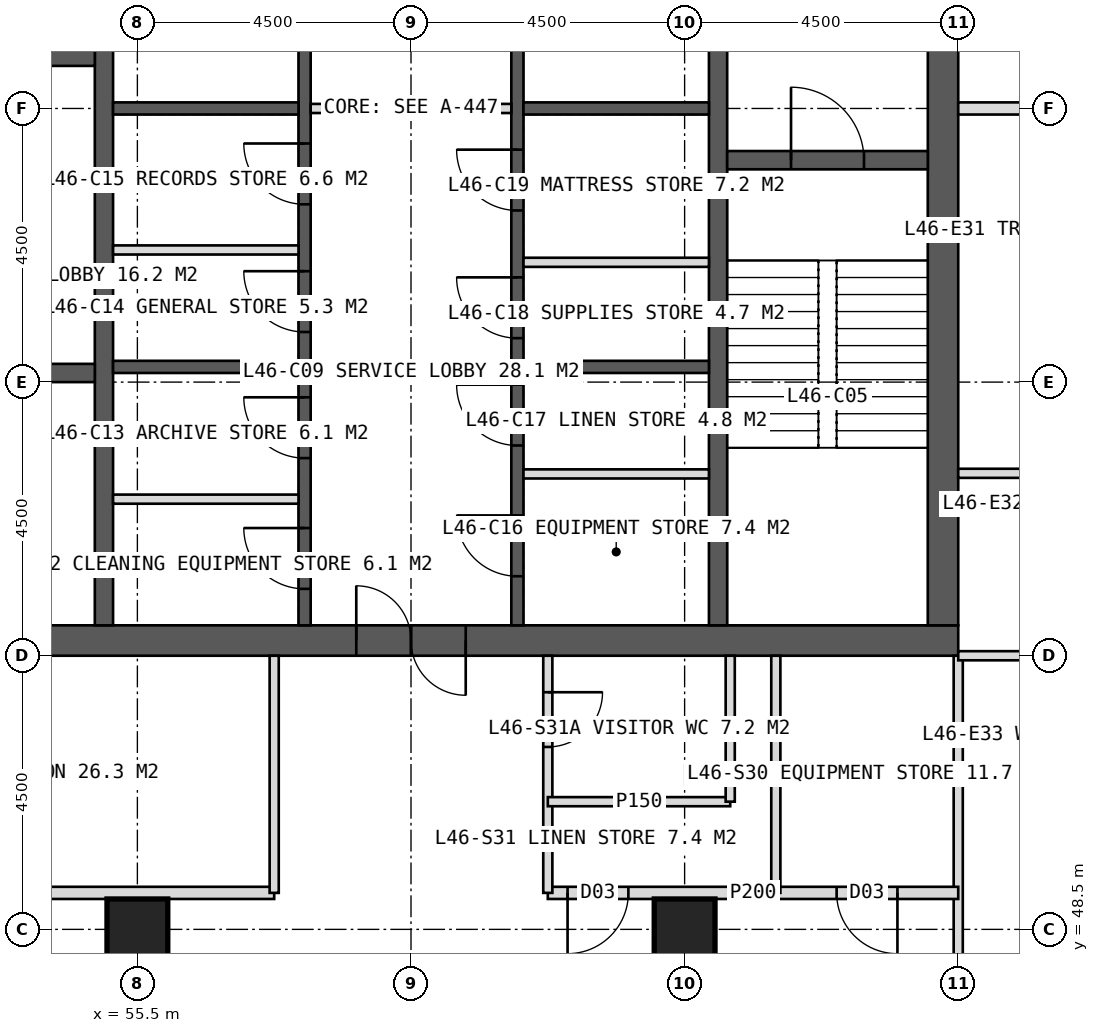
"""IFC4 building model, lengths in metres.
Left out: names, types, materials, properties, quantities, classifications, styles, units other than length and angle.
Written with IfcOpenShell. Run it as: python <this file> out.ifc"""

import sys

from ifc_helpers import new_model, si_unit, direction, frame, frame_2d, origin, origin_2d, place, context, subcontext, project, spatial, rectangle, hollow_rectangle, extrude, element, fill, save


model = new_model("IFC4")
c1 = context("Model", 3, precision=1e-05, world=origin(), true_north=direction((0.0, 1.0)))
c2 = subcontext(c1, "Body", "Model", "MODEL_VIEW")
j1 = project(units=[si_unit("LENGTHUNIT", "METRE"), si_unit("PLANEANGLEUNIT", "RADIAN")], contexts=[c1])
p1 = place(None, origin())
s1 = spatial("IfcSite", under=j1, at=p1, CompositionType="ELEMENT")
p2 = place(p1, origin())
s2 = spatial("IfcBuilding", under=s1, at=p2, CompositionType="ELEMENT")
p3 = place(p2, frame((0.0, 0.0, 193.0)))
s3 = spatial("IfcBuildingStorey", under=s2, at=p3, CompositionType="ELEMENT", Elevation=193.0)
p4 = place(p3, frame((51.0, 53.25, 0.0), z_axis=(0.0, 0.0, 1.0), x_axis=(1.0, 0.0, 0.0)))
e1 = element("IfcWall", 1, at=p4, inside=s3, PredefinedType="SHEAR", context=c2, shape_type="SweptSolid", body=[
    extrude(rectangle(XDim=18.0, YDim=0.5, at=frame_2d((9.0, 0.0))), origin(), (0.0, 0.0, 1.0), 4.0),
])
p5 = place(p4, frame((8.1, 0.0, 0.0)))
e2 = element("IfcOpeningElement", 2, at=p5, cuts=e1, PredefinedType="OPENING", context=c2, shape_type="SweptSolid", body=[
    extrude(rectangle(XDim=1.8, YDim=2.2, at=frame_2d((0.9, 1.1))), frame((0.0, 0.26, 0.0), z_axis=(0.0, -1.0, 0.0), x_axis=(1.0, 0.0, 0.0)), (0.0, 0.0, 1.0), 0.52),
])
p6 = place(p3, frame((68.75, 53.5, 0.0), z_axis=(0.0, 0.0, 1.0), x_axis=(0.0, 1.0, 0.0)))
e3 = element("IfcWall", 3, at=p6, inside=s3, PredefinedType="SHEAR", context=c2, shape_type="SweptSolid", body=[
    extrude(rectangle(XDim=17.0, YDim=0.5, at=frame_2d((8.5, 0.0))), origin(), (0.0, 0.0, 1.0), 4.0),
])
p7 = place(p6, frame((9.6, 0.0, 0.0)))
e4 = element("IfcOpeningElement", 4, at=p7, cuts=e3, PredefinedType="OPENING", context=c2, shape_type="SweptSolid", body=[
    extrude(rectangle(XDim=1.5, YDim=2.2, at=frame_2d((0.75, 1.1))), frame((0.0, 0.26, 0.0), z_axis=(0.0, -1.0, 0.0), x_axis=(1.0, 0.0, 0.0)), (0.0, 0.0, 1.0), 0.52),
])
for number, where, z_axis, x_axis in (
    (5, (54.95, 53.5, 0.0), (0.0, 0.0, 1.0), (0.0, 1.0, 0.0)),
    (6, (65.05, 53.5, 0.0), (0.0, 0.0, 1.0), (0.0, 1.0, 0.0)),
):
    element("IfcWall", number, at=place(p3, frame(where, z_axis=z_axis, x_axis=x_axis)), inside=s3, PredefinedType="SHEAR", context=c2, shape_type="SweptSolid", body=[
        extrude(rectangle(XDim=17.0, YDim=0.3, at=frame_2d((8.5, 0.0))), origin(), (0.0, 0.0, 1.0), 4.0),
    ])
p8 = place(p3, frame((58.25, 53.5, 0.0), z_axis=(0.0, 0.0, 1.0), x_axis=(0.0, 1.0, 0.0)))
e7 = element("IfcWall", 7, at=p8, inside=s3, PredefinedType="SHEAR", context=c2, shape_type="SweptSolid", body=[
    extrude(rectangle(XDim=17.0, YDim=0.2, at=frame_2d((8.5, 0.0))), origin(), (0.0, 0.0, 1.0), 4.0),
])
p9 = place(p8, frame((0.6, 0.0, 0.0)))
e8 = element("IfcOpeningElement", 8, at=p9, cuts=e7, PredefinedType="OPENING", context=c2, shape_type="SweptSolid", body=[
    extrude(rectangle(XDim=1.0, YDim=2.1, at=frame_2d((0.5, 1.05))), frame((0.0, 0.11, 0.0), z_axis=(0.0, -1.0, 0.0), x_axis=(1.0, 0.0, 0.0)), (0.0, 0.0, 1.0), 0.22),
])
p10 = place(p8, frame((2.75, 0.0, 0.0)))
e9 = element("IfcOpeningElement", 9, at=p10, cuts=e7, PredefinedType="OPENING", context=c2, shape_type="SweptSolid", body=[
    extrude(rectangle(XDim=1.0, YDim=2.1, at=frame_2d((0.5, 1.05))), frame((0.0, 0.11, 0.0), z_axis=(0.0, -1.0, 0.0), x_axis=(1.0, 0.0, 0.0)), (0.0, 0.0, 1.0), 0.22),
])
p11 = place(p8, frame((4.824, 0.0, 0.0)))
e10 = element("IfcOpeningElement", 10, at=p11, cuts=e7, PredefinedType="OPENING", context=c2, shape_type="SweptSolid", body=[
    extrude(rectangle(XDim=1.0, YDim=2.1, at=frame_2d((0.5, 1.05))), frame((0.0, 0.11, 0.0), z_axis=(0.0, -1.0, 0.0), x_axis=(1.0, 0.0, 0.0)), (0.0, 0.0, 1.0), 0.22),
])
p12 = place(p8, frame((6.924, 0.0, 0.0)))
e11 = element("IfcOpeningElement", 11, at=p12, cuts=e7, PredefinedType="OPENING", context=c2, shape_type="SweptSolid", body=[
    extrude(rectangle(XDim=1.0, YDim=2.1, at=frame_2d((0.5, 1.05))), frame((0.0, 0.11, 0.0), z_axis=(0.0, -1.0, 0.0), x_axis=(1.0, 0.0, 0.0)), (0.0, 0.0, 1.0), 0.22),
])
p13 = place(p8, frame((10.025, 0.0, 0.0)))
e12 = element("IfcOpeningElement", 12, at=p13, cuts=e7, PredefinedType="OPENING", context=c2, shape_type="SweptSolid", body=[
    extrude(rectangle(XDim=1.4, YDim=2.2, at=frame_2d((0.7, 1.1))), frame((0.0, 0.11, 0.0), z_axis=(0.0, -1.0, 0.0), x_axis=(1.0, 0.0, 0.0)), (0.0, 0.0, 1.0), 0.22),
])
p14 = place(p8, frame((14.325, 0.0, 0.0)))
e13 = element("IfcOpeningElement", 13, at=p14, cuts=e7, PredefinedType="OPENING", context=c2, shape_type="SweptSolid", body=[
    extrude(rectangle(XDim=1.4, YDim=2.2, at=frame_2d((0.7, 1.1))), frame((0.0, 0.11, 0.0), z_axis=(0.0, -1.0, 0.0), x_axis=(1.0, 0.0, 0.0)), (0.0, 0.0, 1.0), 0.22),
])
p15 = place(p3, frame((61.75, 53.5, 0.0), z_axis=(0.0, 0.0, 1.0), x_axis=(0.0, 1.0, 0.0)))
e14 = element("IfcWall", 14, at=p15, inside=s3, PredefinedType="SHEAR", context=c2, shape_type="SweptSolid", body=[
    extrude(rectangle(XDim=17.0, YDim=0.2, at=frame_2d((8.5, 0.0))), origin(), (0.0, 0.0, 1.0), 4.0),
])
p16 = place(p15, frame((0.808, 0.0, 0.0)))
e15 = element("IfcOpeningElement", 15, at=p16, cuts=e14, PredefinedType="OPENING", context=c2, shape_type="SweptSolid", body=[
    extrude(rectangle(XDim=1.0, YDim=2.1, at=frame_2d((0.5, 1.05))), frame((0.0, 0.11, 0.0), z_axis=(0.0, -1.0, 0.0), x_axis=(1.0, 0.0, 0.0)), (0.0, 0.0, 1.0), 0.22),
])
p17 = place(p15, frame((2.958, 0.0, 0.0)))
e16 = element("IfcOpeningElement", 16, at=p17, cuts=e14, PredefinedType="OPENING", context=c2, shape_type="SweptSolid", body=[
    extrude(rectangle(XDim=1.0, YDim=2.1, at=frame_2d((0.5, 1.05))), frame((0.0, 0.11, 0.0), z_axis=(0.0, -1.0, 0.0), x_axis=(1.0, 0.0, 0.0)), (0.0, 0.0, 1.0), 0.22),
])
p18 = place(p15, frame((4.722, 0.0, 0.0)))
e17 = element("IfcOpeningElement", 17, at=p18, cuts=e14, PredefinedType="OPENING", context=c2, shape_type="SweptSolid", body=[
    extrude(rectangle(XDim=1.0, YDim=2.1, at=frame_2d((0.5, 1.05))), frame((0.0, 0.11, 0.0), z_axis=(0.0, -1.0, 0.0), x_axis=(1.0, 0.0, 0.0)), (0.0, 0.0, 1.0), 0.22),
])
p19 = place(p15, frame((6.823, 0.0, 0.0)))
e18 = element("IfcOpeningElement", 18, at=p19, cuts=e14, PredefinedType="OPENING", context=c2, shape_type="SweptSolid", body=[
    extrude(rectangle(XDim=1.0, YDim=2.1, at=frame_2d((0.5, 1.05))), frame((0.0, 0.11, 0.0), z_axis=(0.0, -1.0, 0.0), x_axis=(1.0, 0.0, 0.0)), (0.0, 0.0, 1.0), 0.22),
])
p20 = place(p15, frame((10.025, 0.0, 0.0)))
e19 = element("IfcOpeningElement", 19, at=p20, cuts=e14, PredefinedType="OPENING", context=c2, shape_type="SweptSolid", body=[
    extrude(rectangle(XDim=1.4, YDim=2.2, at=frame_2d((0.7, 1.1))), frame((0.0, 0.11, 0.0), z_axis=(0.0, -1.0, 0.0), x_axis=(1.0, 0.0, 0.0)), (0.0, 0.0, 1.0), 0.22),
])
p21 = place(p15, frame((14.325, 0.0, 0.0)))
e20 = element("IfcOpeningElement", 20, at=p21, cuts=e14, PredefinedType="OPENING", context=c2, shape_type="SweptSolid", body=[
    extrude(rectangle(XDim=1.4, YDim=2.2, at=frame_2d((0.7, 1.1))), frame((0.0, 0.11, 0.0), z_axis=(0.0, -1.0, 0.0), x_axis=(1.0, 0.0, 0.0)), (0.0, 0.0, 1.0), 0.22),
])
for number, where, z_axis, x_axis in (
    (21, (55.1, 57.75, 0.0), (0.0, 0.0, 1.0), (1.0, 0.0, 0.0)),
    (22, (61.85, 57.75, 0.0), (0.0, 0.0, 1.0), (1.0, 0.0, 0.0)),
    (23, (55.1, 62.0, 0.0), (0.0, 0.0, 1.0), (1.0, 0.0, 0.0)),
    (24, (61.85, 62.0, 0.0), (0.0, 0.0, 1.0), (1.0, 0.0, 0.0)),
):
    element("IfcWall", number, at=place(p3, frame(where, z_axis=z_axis, x_axis=x_axis)), inside=s3, PredefinedType="SHEAR", context=c2, shape_type="SweptSolid", body=[
        extrude(rectangle(XDim=3.05, YDim=0.2, at=frame_2d((1.525, 0.0))), origin(), (0.0, 0.0, 1.0), 4.0),
    ])
p22 = place(p3, frame((51.5, 62.85, 0.0), z_axis=(0.0, 0.0, 1.0), x_axis=(1.0, 0.0, 0.0)))
e25 = element("IfcWall", 25, at=p22, inside=s3, PredefinedType="SHEAR", context=c2, shape_type="SweptSolid", body=[
    extrude(rectangle(XDim=3.3, YDim=0.3, at=frame_2d((1.65, 0.0))), origin(), (0.0, 0.0, 1.0), 4.0),
])
p23 = place(p22, frame((1.15, 0.0, 0.0)))
e26 = element("IfcOpeningElement", 26, at=p23, cuts=e25, PredefinedType="OPENING", context=c2, shape_type="SweptSolid", body=[
    extrude(rectangle(XDim=1.2, YDim=2.1, at=frame_2d((0.6, 1.05))), frame((0.0, 0.16, 0.0), z_axis=(0.0, -1.0, 0.0), x_axis=(1.0, 0.0, 0.0)), (0.0, 0.0, 1.0), 0.32),
])
p24 = place(p3, frame((51.5, 57.65, 0.0), z_axis=(0.0, 0.0, 1.0), x_axis=(1.0, 0.0, 0.0)))
e27 = element("IfcWall", 27, at=p24, inside=s3, PredefinedType="SHEAR", context=c2, shape_type="SweptSolid", body=[
    extrude(rectangle(XDim=3.3, YDim=0.3, at=frame_2d((1.65, 0.0))), origin(), (0.0, 0.0, 1.0), 4.0),
])
p25 = place(p24, frame((1.15, 0.0, 0.0)))
e28 = element("IfcOpeningElement", 28, at=p25, cuts=e27, PredefinedType="OPENING", context=c2, shape_type="SweptSolid", body=[
    extrude(rectangle(XDim=1.2, YDim=2.2, at=frame_2d((0.6, 1.1))), frame((0.0, 0.16, 0.0), z_axis=(0.0, -1.0, 0.0), x_axis=(1.0, 0.0, 0.0)), (0.0, 0.0, 1.0), 0.32),
])
p26 = place(p3, frame((65.2, 61.15, 0.0), z_axis=(0.0, 0.0, 1.0), x_axis=(1.0, 0.0, 0.0)))
e29 = element("IfcWall", 29, at=p26, inside=s3, PredefinedType="SHEAR", context=c2, shape_type="SweptSolid", body=[
    extrude(rectangle(XDim=3.3, YDim=0.3, at=frame_2d((1.65, 0.0))), origin(), (0.0, 0.0, 1.0), 4.0),
])
p27 = place(p26, frame((1.05, 0.0, 0.0)))
e30 = element("IfcOpeningElement", 30, at=p27, cuts=e29, PredefinedType="OPENING", context=c2, shape_type="SweptSolid", body=[
    extrude(rectangle(XDim=1.2, YDim=2.1, at=frame_2d((0.6, 1.05))), frame((0.0, 0.16, 0.0), z_axis=(0.0, -1.0, 0.0), x_axis=(1.0, 0.0, 0.0)), (0.0, 0.0, 1.0), 0.32),
])
for number, where, z_axis, x_axis in (
    (31, (55.5, 48.5, 0.0), (0.0, 0.0, 1.0), (1.0, 0.0, 0.0)),
    (32, (64.5, 48.5, 0.0), (0.0, 0.0, 1.0), (1.0, 0.0, 0.0)),
):
    element("IfcColumn", number, at=place(p3, frame(where, z_axis=z_axis, x_axis=x_axis)), inside=s3, PredefinedType="COLUMN", context=c2, shape_type="SweptSolid", body=[
        extrude(hollow_rectangle(XDim=1.0, YDim=1.0, WallThickness=0.1, at=origin_2d()), origin(), (0.0, 0.0, 1.0), 4.0),
    ])
p28 = place(p3, frame((69.0, 53.0, 0.0), z_axis=(0.0, 0.0, 1.0), x_axis=(0.0, -1.0, 0.0)))
e33 = element("IfcWall", 33, at=p28, inside=s3, PredefinedType="PARTITIONING", context=c2, shape_type="SweptSolid", body=[
    extrude(rectangle(XDim=5.4, YDim=0.15, at=frame_2d((2.7, 0.0))), origin(), (0.0, 0.0, 1.0), 3.75),
])
p29 = place(p3, frame((69.0, 49.1, 0.0), z_axis=(0.0, 0.0, 1.0), x_axis=(-1.0, 0.0, 0.0)))
e34 = element("IfcWall", 34, at=p29, inside=s3, PredefinedType="PARTITIONING", context=c2, shape_type="SweptSolid", body=[
    extrude(rectangle(XDim=6.75, YDim=0.2, at=frame_2d((3.375, 0.0))), origin(), (0.0, 0.0, 1.0), 3.75),
])
p30 = place(p29, frame((1.0, 0.0, 0.0)))
e35 = element("IfcOpeningElement", 35, at=p30, cuts=e34, PredefinedType="OPENING", context=c2, shape_type="SweptSolid", body=[
    extrude(rectangle(XDim=1.0, YDim=2.1, at=frame_2d((0.5, 1.05))), frame((0.0, 0.11, 0.0), z_axis=(0.0, -1.0, 0.0), x_axis=(1.0, 0.0, 0.0)), (0.0, 0.0, 1.0), 0.22),
])
p31 = place(p29, frame((5.425, 0.0, 0.0)))
e36 = element("IfcOpeningElement", 36, at=p31, cuts=e34, PredefinedType="OPENING", context=c2, shape_type="SweptSolid", body=[
    extrude(rectangle(XDim=1.0, YDim=2.1, at=frame_2d((0.5, 1.05))), frame((0.0, 0.11, 0.0), z_axis=(0.0, -1.0, 0.0), x_axis=(1.0, 0.0, 0.0)), (0.0, 0.0, 1.0), 0.22),
])
p32 = place(p3, frame((57.75, 49.1, 0.0), z_axis=(0.0, 0.0, 1.0), x_axis=(-1.0, 0.0, 0.0)))
e37 = element("IfcWall", 37, at=p32, inside=s3, PredefinedType="PARTITIONING", context=c2, shape_type="SweptSolid", body=[
    extrude(rectangle(XDim=12.15, YDim=0.2, at=frame_2d((6.075, 0.0))), origin(), (0.0, 0.0, 1.0), 3.75),
])
p33 = place(p32, frame((4.3, 0.0, 0.0)))
e38 = element("IfcOpeningElement", 38, at=p33, cuts=e37, PredefinedType="OPENING", context=c2, shape_type="SweptSolid", body=[
    extrude(rectangle(XDim=1.0, YDim=2.1, at=frame_2d((0.5, 1.05))), frame((0.0, 0.11, 0.0), z_axis=(0.0, -1.0, 0.0), x_axis=(1.0, 0.0, 0.0)), (0.0, 0.0, 1.0), 0.22),
])
p34 = place(p32, frame((8.95, 0.0, 0.0)))
e39 = element("IfcOpeningElement", 39, at=p34, cuts=e37, PredefinedType="OPENING", context=c2, shape_type="SweptSolid", body=[
    extrude(rectangle(XDim=1.0, YDim=2.1, at=frame_2d((0.5, 1.05))), frame((0.0, 0.11, 0.0), z_axis=(0.0, -1.0, 0.0), x_axis=(1.0, 0.0, 0.0)), (0.0, 0.0, 1.0), 0.22),
])
p35 = place(p3, frame((62.25, 53.0, 0.0), z_axis=(0.0, 0.0, 1.0), x_axis=(0.0, -1.0, 0.0)))
e40 = element("IfcWall", 40, at=p35, inside=s3, PredefinedType="PARTITIONING", context=c2, shape_type="SweptSolid", body=[
    extrude(rectangle(XDim=3.9, YDim=0.15, at=frame_2d((1.95, 0.0))), origin(), (0.0, 0.0, 1.0), 3.75),
])
p36 = place(p35, frame((0.6, 0.0, 0.0)))
e41 = element("IfcOpeningElement", 41, at=p36, cuts=e40, PredefinedType="OPENING", context=c2, shape_type="SweptSolid", body=[
    extrude(rectangle(XDim=0.9, YDim=2.1, at=frame_2d((0.45, 1.05))), frame((0.0, 0.085, 0.0), z_axis=(0.0, -1.0, 0.0), x_axis=(1.0, 0.0, 0.0)), (0.0, 0.0, 1.0), 0.17),
])
for number, where, z_axis, x_axis in (
    (42, (57.75, 53.0, 0.0), (0.0, 0.0, 1.0), (0.0, -1.0, 0.0)),
    (43, (66.0, 53.0, 0.0), (0.0, 0.0, 1.0), (0.0, -1.0, 0.0)),
):
    element("IfcWall", number, at=place(p3, frame(where, z_axis=z_axis, x_axis=x_axis)), inside=s3, PredefinedType="PARTITIONING", context=c2, shape_type="SweptSolid", body=[
        extrude(rectangle(XDim=3.9, YDim=0.15, at=frame_2d((1.95, 0.0))), origin(), (0.0, 0.0, 1.0), 3.75),
    ])
p37 = place(p3, frame((65.25, 50.6, 0.0), z_axis=(0.0, 0.0, 1.0), x_axis=(-1.0, 0.0, 0.0)))
e44 = element("IfcWall", 44, at=p37, inside=s3, PredefinedType="PARTITIONING", context=c2, shape_type="SweptSolid", body=[
    extrude(rectangle(XDim=3.0, YDim=0.15, at=frame_2d((1.5, 0.0))), origin(), (0.0, 0.0, 1.0), 3.75),
])
p38 = place(p3, frame((65.25, 53.0, 0.0), z_axis=(0.0, 0.0, 1.0), x_axis=(0.0, -1.0, 0.0)))
e45 = element("IfcWall", 45, at=p38, inside=s3, PredefinedType="PARTITIONING", context=c2, shape_type="SweptSolid", body=[
    extrude(rectangle(XDim=2.4, YDim=0.15, at=frame_2d((1.2, 0.0))), origin(), (0.0, 0.0, 1.0), 3.75),
])
p39 = place(p3, frame((69.0, 62.0, 0.0), z_axis=(0.0, 0.0, 1.0), x_axis=(1.0, 0.0, 0.0)))
e46 = element("IfcWall", 46, at=p39, inside=s3, PredefinedType="SOLIDWALL", context=c2, shape_type="SweptSolid", body=[
    extrude(rectangle(XDim=5.4, YDim=0.2, at=frame_2d((2.7, 0.0))), origin(), (0.0, 0.0, 1.0), 2.95),
])
for number, where, z_axis, x_axis in (
    (47, (69.0, 56.0, 0.0), (0.0, 0.0, 1.0), (1.0, 0.0, 0.0)),
    (48, (69.0, 53.0, 0.0), (0.0, 0.0, 1.0), (1.0, 0.0, 0.0)),
):
    element("IfcWall", number, at=place(p3, frame(where, z_axis=z_axis, x_axis=x_axis)), inside=s3, PredefinedType="PARTITIONING", context=c2, shape_type="SweptSolid", body=[
        extrude(rectangle(XDim=5.4, YDim=0.15, at=frame_2d((2.7, 0.0))), origin(), (0.0, 0.0, 1.0), 3.75),
    ])
for number, where, z_axis, x_axis in (
    (49, (55.1, 55.575, 0.0), (0.0, 0.0, 1.0), (1.0, 0.0, 0.0)),
    (50, (61.85, 55.99, 0.0), (0.0, 0.0, 1.0), (1.0, 0.0, 0.0)),
    (51, (55.1, 59.673, 0.0), (0.0, 0.0, 1.0), (1.0, 0.0, 0.0)),
    (52, (61.85, 59.47, 0.0), (0.0, 0.0, 1.0), (1.0, 0.0, 0.0)),
):
    element("IfcWall", number, at=place(p3, frame(where, z_axis=z_axis, x_axis=x_axis)), inside=s3, PredefinedType="PARTITIONING", context=c2, shape_type="SweptSolid", body=[
        extrude(rectangle(XDim=3.05, YDim=0.15, at=frame_2d((1.525, 0.0))), origin(), (0.0, 0.0, 1.0), 3.75),
    ])
p40 = place(p3, frame((58.35, 62.0, 0.0), z_axis=(0.0, 0.0, 1.0), x_axis=(1.0, 0.0, 0.0)))
e53 = element("IfcWall", 53, at=p40, inside=s3, PredefinedType="PARTITIONING", context=c2, shape_type="SweptSolid", body=[
    extrude(rectangle(XDim=3.3, YDim=0.15, at=frame_2d((1.65, 0.0))), origin(), (0.0, 0.0, 1.0), 3.75),
])
p41 = place(p30, origin())
e54 = element("IfcDoor", 54, at=p41, inside=s3, OperationType="SINGLE_SWING_LEFT", PredefinedType="DOOR", context=c2, shape_type="SweptSolid", body=[
    extrude(rectangle(XDim=1.0, YDim=2.1, at=frame_2d((0.5, 1.05))), frame((0.0, 0.025, 0.0), z_axis=(0.0, -1.0, 0.0), x_axis=(1.0, 0.0, 0.0)), (0.0, 0.0, 1.0), 0.05),
])
fill(e35, e54)
p42 = place(p36, origin())
e55 = element("IfcDoor", 55, at=p42, inside=s3, OperationType="SINGLE_SWING_LEFT", PredefinedType="DOOR", context=c2, shape_type="SweptSolid", body=[
    extrude(rectangle(XDim=0.9, YDim=2.1, at=frame_2d((0.45, 1.05))), frame((0.0, 0.025, 0.0), z_axis=(0.0, -1.0, 0.0), x_axis=(1.0, 0.0, 0.0)), (0.0, 0.0, 1.0), 0.05),
])
fill(e41, e55)
p43 = place(p31, origin())
e56 = element("IfcDoor", 56, at=p43, inside=s3, OperationType="SINGLE_SWING_RIGHT", PredefinedType="DOOR", context=c2, shape_type="SweptSolid", body=[
    extrude(rectangle(XDim=1.0, YDim=2.1, at=frame_2d((0.5, 1.05))), frame((0.0, 0.025, 0.0), z_axis=(0.0, -1.0, 0.0), x_axis=(1.0, 0.0, 0.0)), (0.0, 0.0, 1.0), 0.05),
])
fill(e36, e56)
p44 = place(p27, origin())
e57 = element("IfcDoor", 57, at=p44, inside=s3, OperationType="SINGLE_SWING_LEFT", PredefinedType="DOOR", context=c2, shape_type="SweptSolid", body=[
    extrude(rectangle(XDim=1.2, YDim=2.1, at=frame_2d((0.6, 1.05))), frame((0.0, 0.025, 0.0), z_axis=(0.0, -1.0, 0.0), x_axis=(1.0, 0.0, 0.0)), (0.0, 0.0, 1.0), 0.05),
])
fill(e30, e57)
p45 = place(p9, origin())
e58 = element("IfcDoor", 58, at=p45, inside=s3, OperationType="SINGLE_SWING_RIGHT", PredefinedType="DOOR", context=c2, shape_type="SweptSolid", body=[
    extrude(rectangle(XDim=1.0, YDim=2.1, at=frame_2d((0.5, 1.05))), frame((0.0, 0.025, 0.0), z_axis=(0.0, -1.0, 0.0), x_axis=(1.0, 0.0, 0.0)), (0.0, 0.0, 1.0), 0.05),
])
fill(e8, e58)
p46 = place(p10, origin())
e59 = element("IfcDoor", 59, at=p46, inside=s3, OperationType="SINGLE_SWING_RIGHT", PredefinedType="DOOR", context=c2, shape_type="SweptSolid", body=[
    extrude(rectangle(XDim=1.0, YDim=2.1, at=frame_2d((0.5, 1.05))), frame((0.0, 0.025, 0.0), z_axis=(0.0, -1.0, 0.0), x_axis=(1.0, 0.0, 0.0)), (0.0, 0.0, 1.0), 0.05),
])
fill(e9, e59)
p47 = place(p16, origin())
e60 = element("IfcDoor", 60, at=p47, inside=s3, OperationType="SINGLE_SWING_RIGHT", PredefinedType="DOOR", context=c2, shape_type="SweptSolid", body=[
    extrude(rectangle(XDim=1.0, YDim=2.1, at=frame_2d((0.5, 1.05))), frame((0.0, 0.025, 0.0), z_axis=(0.0, -1.0, 0.0), x_axis=(1.0, 0.0, 0.0)), (0.0, 0.0, 1.0), 0.05),
])
fill(e15, e60)
p48 = place(p17, origin())
e61 = element("IfcDoor", 61, at=p48, inside=s3, OperationType="SINGLE_SWING_RIGHT", PredefinedType="DOOR", context=c2, shape_type="SweptSolid", body=[
    extrude(rectangle(XDim=1.0, YDim=2.1, at=frame_2d((0.5, 1.05))), frame((0.0, 0.025, 0.0), z_axis=(0.0, -1.0, 0.0), x_axis=(1.0, 0.0, 0.0)), (0.0, 0.0, 1.0), 0.05),
])
fill(e16, e61)
p49 = place(p11, origin())
e62 = element("IfcDoor", 62, at=p49, inside=s3, OperationType="SINGLE_SWING_RIGHT", PredefinedType="DOOR", context=c2, shape_type="SweptSolid", body=[
    extrude(rectangle(XDim=1.0, YDim=2.1, at=frame_2d((0.5, 1.05))), frame((0.0, 0.025, 0.0), z_axis=(0.0, -1.0, 0.0), x_axis=(1.0, 0.0, 0.0)), (0.0, 0.0, 1.0), 0.05),
])
fill(e10, e62)
p50 = place(p12, origin())
e63 = element("IfcDoor", 63, at=p50, inside=s3, OperationType="SINGLE_SWING_RIGHT", PredefinedType="DOOR", context=c2, shape_type="SweptSolid", body=[
    extrude(rectangle(XDim=1.0, YDim=2.1, at=frame_2d((0.5, 1.05))), frame((0.0, 0.025, 0.0), z_axis=(0.0, -1.0, 0.0), x_axis=(1.0, 0.0, 0.0)), (0.0, 0.0, 1.0), 0.05),
])
fill(e11, e63)
p51 = place(p18, origin())
e64 = element("IfcDoor", 64, at=p51, inside=s3, OperationType="SINGLE_SWING_RIGHT", PredefinedType="DOOR", context=c2, shape_type="SweptSolid", body=[
    extrude(rectangle(XDim=1.0, YDim=2.1, at=frame_2d((0.5, 1.05))), frame((0.0, 0.025, 0.0), z_axis=(0.0, -1.0, 0.0), x_axis=(1.0, 0.0, 0.0)), (0.0, 0.0, 1.0), 0.05),
])
fill(e17, e64)
p52 = place(p19, origin())
e65 = element("IfcDoor", 65, at=p52, inside=s3, OperationType="SINGLE_SWING_RIGHT", PredefinedType="DOOR", context=c2, shape_type="SweptSolid", body=[
    extrude(rectangle(XDim=1.0, YDim=2.1, at=frame_2d((0.5, 1.05))), frame((0.0, 0.025, 0.0), z_axis=(0.0, -1.0, 0.0), x_axis=(1.0, 0.0, 0.0)), (0.0, 0.0, 1.0), 0.05),
])
fill(e18, e65)
p53 = place(p5, origin())
e66 = element("IfcDoor", 66, at=p53, inside=s3, OperationType="DOUBLE_DOOR_SINGLE_SWING", PredefinedType="DOOR", context=c2, shape_type="SweptSolid", body=[
    extrude(rectangle(XDim=1.8, YDim=2.2, at=frame_2d((0.9, 1.1))), frame((0.0, 0.025, 0.0), z_axis=(0.0, -1.0, 0.0), x_axis=(1.0, 0.0, 0.0)), (0.0, 0.0, 1.0), 0.05),
])
fill(e2, e66)
save(model, sys.argv[1])
